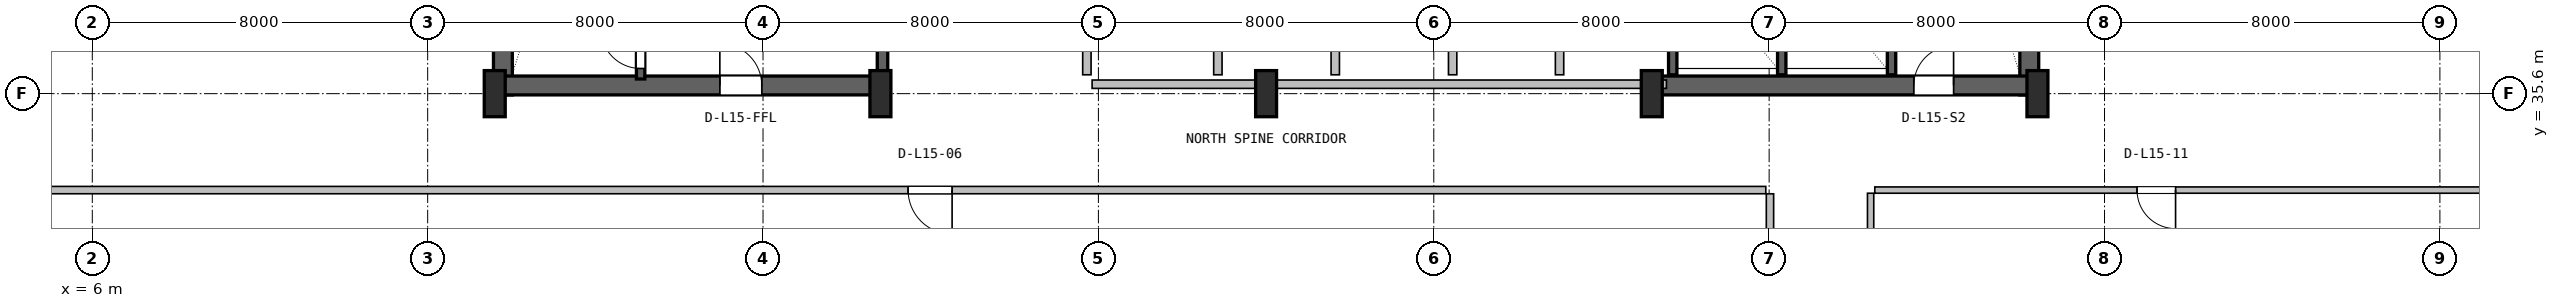
"""IFC4 building model, lengths in metres.
Left out: names, types, materials, properties, quantities, classifications, styles, units other than length and angle.
Written with IfcOpenShell. Run it as: python <this file> out.ifc"""

import sys

from ifc_helpers import new_model, si_unit, direction, frame, frame_2d, origin, origin_2d, place, context, subcontext, project, spatial, rectangle, i_section, extrude, source, transform, mapped, element, fill, save


model = new_model("IFC4")
c1 = context("Model", 3, precision=1e-05, world=origin(), true_north=direction((0.0, 1.0)))
c2 = subcontext(c1, "Body", "Model", "MODEL_VIEW")
j1 = project(units=[si_unit("LENGTHUNIT", "METRE"), si_unit("PLANEANGLEUNIT", "RADIAN")], contexts=[c1])
p1 = place(None, origin())
s1 = spatial("IfcSite", under=j1, at=p1, CompositionType="ELEMENT")
p2 = place(p1, origin())
s2 = spatial("IfcBuilding", under=s1, at=p2, CompositionType="ELEMENT")
p3 = place(p2, frame((0.0, 0.0, 66.6)))
s3 = spatial("IfcBuildingStorey", under=s2, at=p3, CompositionType="ELEMENT", Elevation=66.6)
for number, where, z_axis, x_axis in (
    (1, (15.795, 35.57, 0.0), (0.0, 0.0, 1.0), (0.0, 1.0, 0.0)),
    (2, (52.205, 35.57, 0.0), (0.0, 0.0, 1.0), (0.0, 1.0, 0.0)),
):
    element("IfcWall", number, at=place(p3, frame(where, z_axis=z_axis, x_axis=x_axis)), inside=s3, PredefinedType="SHEAR", context=c2, shape_type="SweptSolid", body=[
        extrude(rectangle(XDim=11.23, YDim=0.45, at=frame_2d((5.615, 0.0))), origin(), (0.0, 0.0, 1.0), 3.65),
    ])
p4 = place(p3, frame((15.57, 35.795, 0.0), z_axis=(0.0, 0.0, 1.0), x_axis=(1.0, 0.0, 0.0)))
e3 = element("IfcWall", 3, at=p4, inside=s3, PredefinedType="SHEAR", context=c2, shape_type="SweptSolid", body=[
    extrude(rectangle(XDim=9.23, YDim=0.45, at=frame_2d((4.615, 0.0))), origin(), (0.0, 0.0, 1.0), 3.65),
])
p5 = place(p4, frame((5.4, 0.0, 0.0)))
e4 = element("IfcOpeningElement", 4, at=p5, cuts=e3, PredefinedType="OPENING", context=c2, shape_type="SweptSolid", body=[
    extrude(rectangle(XDim=1.0, YDim=2.1, at=frame_2d((0.5, 1.05))), frame((0.0, 0.235, 0.0), z_axis=(0.0, -1.0, 0.0), x_axis=(1.0, 0.0, 0.0)), (0.0, 0.0, 1.0), 0.47),
])
p6 = place(p3, frame((43.2, 35.795, 0.0), z_axis=(0.0, 0.0, 1.0), x_axis=(1.0, 0.0, 0.0)))
e5 = element("IfcWall", 5, at=p6, inside=s3, PredefinedType="SHEAR", context=c2, shape_type="SweptSolid", body=[
    extrude(rectangle(XDim=9.23, YDim=0.45, at=frame_2d((4.615, 0.0))), origin(), (0.0, 0.0, 1.0), 3.65),
])
p7 = place(p6, frame((6.25, 0.0, 0.0)))
e6 = element("IfcOpeningElement", 6, at=p7, cuts=e5, PredefinedType="OPENING", context=c2, shape_type="SweptSolid", body=[
    extrude(rectangle(XDim=0.95, YDim=2.1, at=frame_2d((0.475, 1.05))), frame((0.0, 0.235, 0.0), z_axis=(0.0, -1.0, 0.0), x_axis=(1.0, 0.0, 0.0)), (0.0, 0.0, 1.0), 0.47),
])
m1 = source(origin(), c2, "Body", "SweptSolid", [
    extrude(i_section(OverallWidth=0.5, OverallDepth=1.1, WebThickness=0.018, FlangeThickness=0.032, FilletRadius=0.018, at=origin_2d()), origin(), (0.0, 0.0, 1.0), 3.9),
])
for number, where, z_axis, x_axis in (
    (7, (15.6, 35.6, 0.0), (0.0, 0.0, 1.0), (1.0, 0.0, 0.0)),
    (8, (24.8, 35.6, 0.0), (0.0, 0.0, 1.0), (1.0, 0.0, 0.0)),
    (9, (34.0, 35.6, 0.0), (0.0, 0.0, 1.0), (1.0, 0.0, 0.0)),
    (10, (43.2, 35.6, 0.0), (0.0, 0.0, 1.0), (1.0, 0.0, 0.0)),
    (11, (52.4, 35.6, 0.0), (0.0, 0.0, 1.0), (1.0, 0.0, 0.0)),
):
    element("IfcColumn", number, at=place(p3, frame(where, z_axis=z_axis, x_axis=x_axis)), inside=s3, PredefinedType="COLUMN", context=c2, shape_type="MappedRepresentation", body=[
        mapped(m1, transform((0.0, 0.0, 0.0), x_axis=(1.0, 0.0, 0.0), y_axis=(0.0, 1.0, 0.0), z_axis=(0.0, 0.0, 1.0), scale=1.0)),
    ])
p8 = place(p3, frame((19.08, 35.95, 0.0), z_axis=(0.0, 0.0, 1.0), x_axis=(0.0, 1.0, 0.0)))
e12 = element("IfcWall", 12, at=p8, inside=s3, PredefinedType="SHEAR", context=c2, shape_type="SweptSolid", body=[
    extrude(rectangle(XDim=9.65, YDim=0.2, at=frame_2d((4.825, 0.0))), origin(), (0.0, 0.0, 1.0), 3.65),
])
p9 = place(p8, frame((0.25, 0.0, 0.0)))
e13 = element("IfcOpeningElement", 13, at=p9, cuts=e12, PredefinedType="OPENING", context=c2, shape_type="SweptSolid", body=[
    extrude(rectangle(XDim=0.95, YDim=2.1, at=frame_2d((0.475, 1.05))), frame((0.0, 0.11, 0.0), z_axis=(0.0, -1.0, 0.0), x_axis=(1.0, 0.0, 0.0)), (0.0, 0.0, 1.0), 0.22),
])
p10 = place(p3, frame((24.85, 36.05, 0.0), z_axis=(0.0, 0.0, 1.0), x_axis=(0.0, 1.0, 0.0)))
e14 = element("IfcWall", 14, at=p10, inside=s3, PredefinedType="SHEAR", context=c2, shape_type="SweptSolid", body=[
    extrude(rectangle(XDim=10.45, YDim=0.25, at=frame_2d((5.225, 0.0))), origin(), (0.0, 0.0, 1.0), 3.65),
])
p11 = place(p3, frame((48.92, 36.05, 0.0), z_axis=(0.0, 0.0, 1.0), x_axis=(0.0, 1.0, 0.0)))
e15 = element("IfcWall", 15, at=p11, inside=s3, PredefinedType="SHEAR", context=c2, shape_type="SweptSolid", body=[
    extrude(rectangle(XDim=10.5, YDim=0.2, at=frame_2d((5.25, 0.0))), origin(), (0.0, 0.0, 1.0), 3.65),
])
for number, where, z_axis, x_axis in (
    (16, (43.7, 36.05, 0.0), (0.0, 0.0, 1.0), (0.0, 1.0, 0.0)),
    (17, (46.3, 36.05, 0.0), (0.0, 0.0, 1.0), (0.0, 1.0, 0.0)),
):
    element("IfcWall", number, at=place(p3, frame(where, z_axis=z_axis, x_axis=x_axis)), inside=s3, PredefinedType="SHEAR", context=c2, shape_type="SweptSolid", body=[
        extrude(rectangle(XDim=3.05, YDim=0.2, at=frame_2d((1.525, 0.0))), origin(), (0.0, 0.0, 1.0), 3.65),
    ])
p12 = place(p3, frame((29.85, 35.825, 0.0), z_axis=(0.0, 0.0, 1.0), x_axis=(1.0, 0.0, 0.0)))
e18 = element("IfcWall", 18, at=p12, inside=s3, PredefinedType="SOLIDWALL", context=c2, shape_type="SweptSolid", body=[
    extrude(rectangle(XDim=13.7, YDim=0.2, at=frame_2d((6.85, 0.0))), origin(), (0.0, 0.0, 1.0), 2.425),
])
for number, where, z_axis, x_axis in (
    (19, (32.85, 36.05, 0.0), (0.0, 0.0, 1.0), (0.0, 1.0, 0.0)),
    (20, (29.725, 36.05, 0.0), (0.0, 0.0, 1.0), (0.0, 1.0, 0.0)),
    (21, (35.65, 36.05, 0.0), (0.0, 0.0, 1.0), (0.0, 1.0, 0.0)),
    (22, (38.45, 36.05, 0.0), (0.0, 0.0, 1.0), (0.0, 1.0, 0.0)),
):
    element("IfcWall", number, at=place(p3, frame(where, z_axis=z_axis, x_axis=x_axis)), inside=s3, PredefinedType="PLUMBINGWALL", context=c2, shape_type="SweptSolid", body=[
        extrude(rectangle(XDim=3.1, YDim=0.2, at=frame_2d((1.55, 0.0))), origin(), (0.0, 0.0, 1.0), 3.63),
    ])
p13 = place(p3, frame((41.0, 36.05, 0.0), z_axis=(0.0, 0.0, 1.0), x_axis=(0.0, 1.0, 0.0)))
e23 = element("IfcWall", 23, at=p13, inside=s3, PredefinedType="SOLIDWALL", context=c2, shape_type="SweptSolid", body=[
    extrude(rectangle(XDim=3.1, YDim=0.2, at=frame_2d((1.55, 0.0))), origin(), (0.0, 0.0, 1.0), 3.63),
])
p14 = place(p3, frame((46.02, 1.38, 0.0), z_axis=(0.0, 0.0, 1.0), x_axis=(0.0, 1.0, 0.0)))
e24 = element("IfcWall", 24, at=p14, inside=s3, PredefinedType="PARTITIONING", context=c2, shape_type="SweptSolid", body=[
    extrude(rectangle(XDim=31.832, YDim=0.175, at=frame_2d((15.916, 0.0))), origin(), (0.0, 0.0, 1.0), 3.208),
])
p15 = place(p3, frame((2.18, 33.3, 0.0), z_axis=(0.0, 0.0, 1.0), x_axis=(1.0, 0.0, 0.0)))
e25 = element("IfcWall", 25, at=p15, inside=s3, PredefinedType="PARTITIONING", context=c2, shape_type="SweptSolid", body=[
    extrude(rectangle(XDim=43.74, YDim=0.175, at=frame_2d((21.87, 0.0))), origin(), (0.0, 0.0, 1.0), 2.852),
])
p16 = place(p15, frame((23.28, 0.0, 0.0)))
e26 = element("IfcOpeningElement", 26, at=p16, cuts=e25, PredefinedType="OPENING", context=c2, shape_type="SweptSolid", body=[
    extrude(rectangle(XDim=1.05, YDim=2.1, at=frame_2d((0.525, 1.05))), frame((0.0, 0.098, 0.0), z_axis=(0.0, -1.0, 0.0), x_axis=(1.0, 0.0, 0.0)), (0.0, 0.0, 1.0), 0.195),
])
p17 = place(p3, frame((48.42, 24.475, 0.0), z_axis=(0.0, 0.0, 1.0), x_axis=(0.0, 1.0, 0.0)))
e27 = element("IfcWall", 27, at=p17, inside=s3, PredefinedType="PARTITIONING", context=c2, shape_type="SweptSolid", body=[
    extrude(rectangle(XDim=8.75, YDim=0.15, at=frame_2d((4.375, 0.0))), origin(), (0.0, 0.0, 1.0), 3.378),
])
p18 = place(p3, frame((48.52, 33.3, 0.0), z_axis=(0.0, 0.0, 1.0), x_axis=(1.0, 0.0, 0.0)))
e28 = element("IfcWall", 28, at=p18, inside=s3, PredefinedType="PARTITIONING", context=c2, shape_type="SweptSolid", body=[
    extrude(rectangle(XDim=17.3, YDim=0.15, at=frame_2d((8.65, 0.0))), origin(), (0.0, 0.0, 1.0), 3.208),
])
p19 = place(p18, frame((6.255, 0.0, 0.0)))
e29 = element("IfcOpeningElement", 29, at=p19, cuts=e28, PredefinedType="OPENING", context=c2, shape_type="SweptSolid", body=[
    extrude(rectangle(XDim=0.92, YDim=2.08, at=frame_2d((0.46, 1.04))), frame((0.0, 0.085, 0.0), z_axis=(0.0, -1.0, 0.0), x_axis=(1.0, 0.0, 0.0)), (0.0, 0.0, 1.0), 0.17),
])
m2 = source(origin(), c2, "Body", "SweptSolid", [
    extrude(rectangle(XDim=0.95, YDim=2.1, at=frame_2d((0.475, 1.05))), frame((0.0, 0.025, 0.0), z_axis=(0.0, -1.0, 0.0), x_axis=(1.0, 0.0, 0.0)), (0.0, 0.0, 1.0), 0.05),
])
p20 = place(p9, origin())
e30 = element("IfcDoor", 30, at=p20, inside=s3, OperationType="SINGLE_SWING_RIGHT", PredefinedType="DOOR", context=c2, shape_type="MappedRepresentation", body=[
    mapped(m2, transform((0.0, 0.0, 0.0), x_axis=(1.0, 0.0, 0.0), y_axis=(0.0, 1.0, 0.0), z_axis=(0.0, 0.0, 1.0), scale=1.0)),
])
fill(e13, e30)
m3 = source(origin(), c2, "Body", "SweptSolid", [
    extrude(rectangle(XDim=1.0, YDim=2.1, at=frame_2d((0.5, 1.05))), frame((0.0, 0.025, 0.0), z_axis=(0.0, -1.0, 0.0), x_axis=(1.0, 0.0, 0.0)), (0.0, 0.0, 1.0), 0.05),
])
p21 = place(p5, origin())
e31 = element("IfcDoor", 31, at=p21, inside=s3, OperationType="SINGLE_SWING_LEFT", PredefinedType="DOOR", context=c2, shape_type="MappedRepresentation", body=[
    mapped(m3, transform((0.0, 0.0, 0.0), x_axis=(1.0, 0.0, 0.0), y_axis=(0.0, 1.0, 0.0), z_axis=(0.0, 0.0, 1.0), scale=1.0)),
])
fill(e4, e31)
p22 = place(p7, origin())
e32 = element("IfcDoor", 32, at=p22, inside=s3, OperationType="SINGLE_SWING_RIGHT", PredefinedType="DOOR", context=c2, shape_type="MappedRepresentation", body=[
    mapped(m2, transform((0.0, 0.0, 0.0), x_axis=(1.0, 0.0, 0.0), y_axis=(0.0, 1.0, 0.0), z_axis=(0.0, 0.0, 1.0), scale=1.0)),
])
fill(e6, e32)
m4 = source(origin(), c2, "Body", "SweptSolid", [
    extrude(rectangle(XDim=1.05, YDim=2.1, at=frame_2d((0.525, 1.05))), frame((0.0, 0.025, 0.0), z_axis=(0.0, -1.0, 0.0), x_axis=(1.0, 0.0, 0.0)), (0.0, 0.0, 1.0), 0.05),
])
p23 = place(p16, frame((1.05, 0.0, 0.0), z_axis=(0.0, 0.0, 1.0), x_axis=(-1.0, 0.0, 0.0)))
e33 = element("IfcDoor", 33, at=p23, inside=s3, OperationType="SINGLE_SWING_RIGHT", PredefinedType="DOOR", context=c2, shape_type="MappedRepresentation", body=[
    mapped(m4, transform((0.0, 0.0, 0.0), x_axis=(1.0, 0.0, 0.0), y_axis=(0.0, 1.0, 0.0), z_axis=(0.0, 0.0, 1.0), scale=1.0)),
])
fill(e26, e33)
m5 = source(origin(), c2, "Body", "SweptSolid", [
    extrude(rectangle(XDim=0.92, YDim=2.08, at=frame_2d((0.46, 1.04))), frame((0.0, 0.025, 0.0), z_axis=(0.0, -1.0, 0.0), x_axis=(1.0, 0.0, 0.0)), (0.0, 0.0, 1.0), 0.05),
])
p24 = place(p19, frame((0.92, 0.0, 0.0), z_axis=(0.0, 0.0, 1.0), x_axis=(-1.0, 0.0, 0.0)))
e34 = element("IfcDoor", 34, at=p24, inside=s3, OperationType="SINGLE_SWING_RIGHT", PredefinedType="DOOR", context=c2, shape_type="MappedRepresentation", body=[
    mapped(m5, transform((0.0, 0.0, 0.0), x_axis=(1.0, 0.0, 0.0), y_axis=(0.0, 1.0, 0.0), z_axis=(0.0, 0.0, 1.0), scale=1.0)),
])
fill(e29, e34)
save(model, sys.argv[1])
